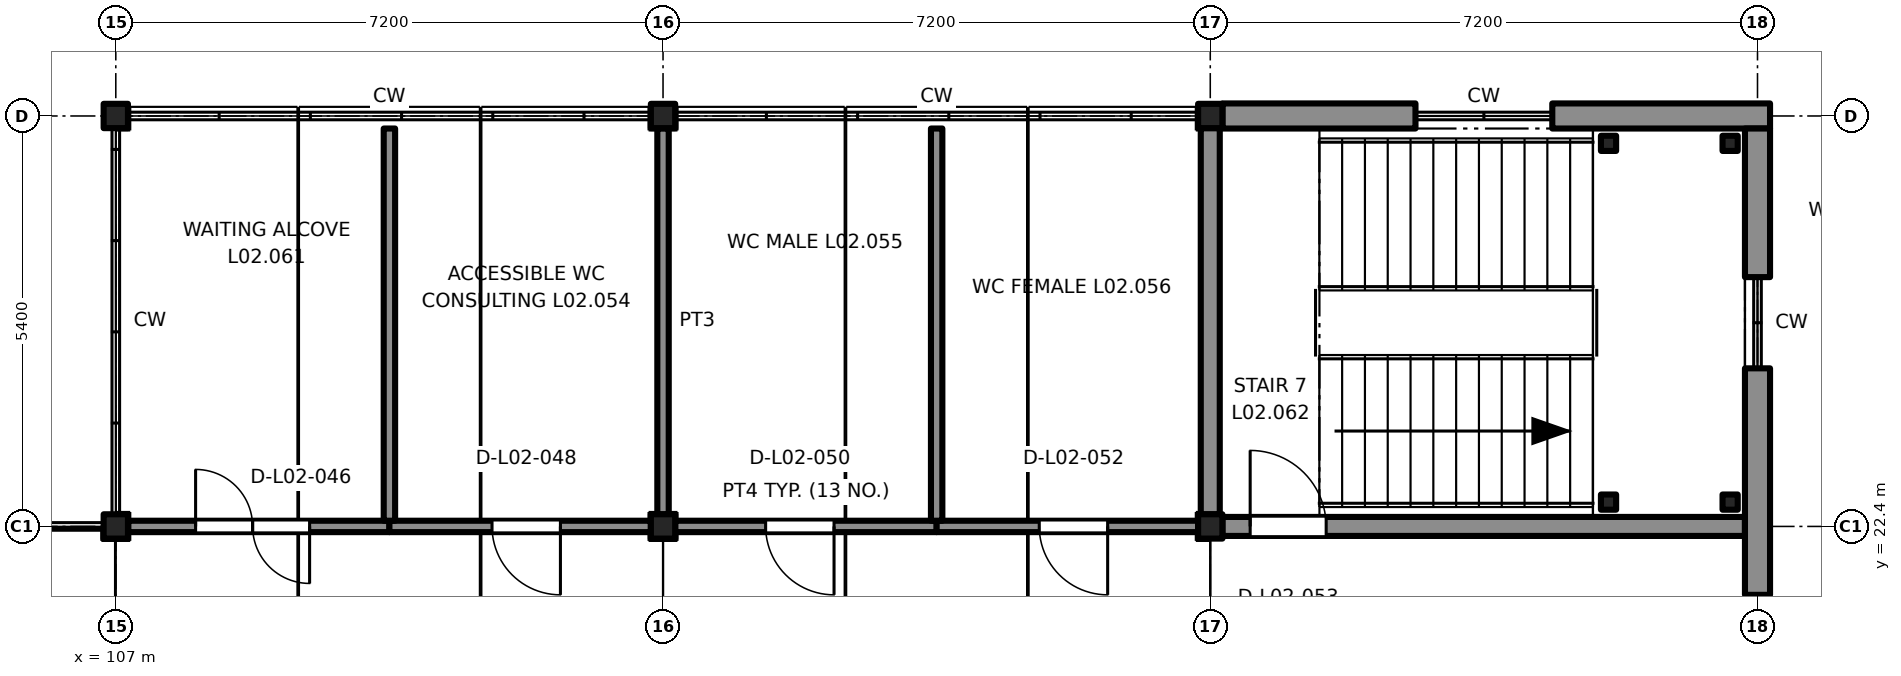
"""IFC4 building model, lengths in metres.
Left out: names, types, materials, properties, quantities, classifications, styles, units other than length and angle.
Written with IfcOpenShell. Run it as: python <this file> out.ifc"""

import sys

from ifc_helpers import new_model, si_unit, direction, frame, frame_2d, origin, origin_2d, place, context, subcontext, project, spatial, rectangle, extrude, element, fill, save


model = new_model("IFC4")
c1 = context("Model", 3, precision=1e-05, world=origin(), true_north=direction((0.0, 1.0)))
c2 = subcontext(c1, "Body", "Model", "MODEL_VIEW")
j1 = project(units=[si_unit("LENGTHUNIT", "METRE"), si_unit("PLANEANGLEUNIT", "RADIAN")], contexts=[c1])
p1 = place(None, origin())
s1 = spatial("IfcSite", under=j1, at=p1, CompositionType="ELEMENT")
p2 = place(p1, origin())
s2 = spatial("IfcBuilding", under=s1, at=p2, CompositionType="ELEMENT")
p3 = place(p2, frame((0.0, 0.0, 10.2)))
s3 = spatial("IfcBuildingStorey", under=s2, at=p3, CompositionType="ELEMENT", Elevation=10.2)
for number, where, z_axis, x_axis in (
    (1, (107.0, 22.4, 0.0), (0.0, 0.0, 1.0), (1.0, 0.0, 0.0)),
    (2, (107.0, 27.8, 0.0), (0.0, 0.0, 1.0), (1.0, 0.0, 0.0)),
    (3, (114.2, 22.4, 0.0), (0.0, 0.0, 1.0), (1.0, 0.0, 0.0)),
    (4, (114.2, 27.8, 0.0), (0.0, 0.0, 1.0), (1.0, 0.0, 0.0)),
    (5, (121.4, 22.4, 0.0), (0.0, 0.0, 1.0), (1.0, 0.0, 0.0)),
    (6, (121.4, 27.8, 0.0), (0.0, 0.0, 1.0), (1.0, 0.0, 0.0)),
):
    element("IfcColumn", number, at=place(p3, frame(where, z_axis=z_axis, x_axis=x_axis)), inside=s3, PredefinedType="COLUMN", context=c2, shape_type="SweptSolid", body=[
        extrude(rectangle(XDim=0.32, YDim=0.32, at=origin_2d()), origin(), (0.0, 0.0, 1.0), 3.9),
    ])
p4 = place(p3, frame((121.56, 22.4, 0.0), z_axis=(0.0, 0.0, 1.0), x_axis=(1.0, 0.0, 0.0)))
e7 = element("IfcWall", 7, at=p4, inside=s3, PredefinedType="SHEAR", context=c2, shape_type="SweptSolid", body=[
    extrude(rectangle(XDim=6.875, YDim=0.25, at=frame_2d((3.438, 0.0))), origin(), (0.0, 0.0, 1.0), 3.65),
])
p5 = place(p4, frame((0.365, 0.0, 0.0)))
e8 = element("IfcOpeningElement", 8, at=p5, cuts=e7, PredefinedType="OPENING", context=c2, shape_type="SweptSolid", body=[
    extrude(rectangle(XDim=1.0, YDim=2.1, at=frame_2d((0.5, 1.05))), frame((0.0, 0.135, 0.0), z_axis=(0.0, -1.0, 0.0), x_axis=(1.0, 0.0, 0.0)), (0.0, 0.0, 1.0), 0.27),
])
p6 = place(p3, frame((121.4, 22.56, 0.0), z_axis=(0.0, 0.0, 1.0), x_axis=(0.0, 1.0, 0.0)))
e9 = element("IfcWall", 9, at=p6, inside=s3, PredefinedType="SHEAR", context=c2, shape_type="SweptSolid", body=[
    extrude(rectangle(XDim=5.08, YDim=0.25, at=frame_2d((2.54, 0.0))), origin(), (0.0, 0.0, 1.0), 3.65),
])
for number, where, z_axis, x_axis in (
    (10, (128.24, 22.72, 0.0), (0.0, 0.0, 1.0), (1.0, 0.0, 0.0)),
    (11, (128.24, 27.44, 0.0), (0.0, 0.0, 1.0), (1.0, 0.0, 0.0)),
    (12, (126.64, 22.72, 0.0), (0.0, 0.0, 1.0), (1.0, 0.0, 0.0)),
    (13, (126.64, 27.44, 0.0), (0.0, 0.0, 1.0), (1.0, 0.0, 0.0)),
):
    element("IfcColumn", number, at=place(p3, frame(where, z_axis=z_axis, x_axis=x_axis)), inside=s3, PredefinedType="COLUMN", context=c2, shape_type="SweptSolid", body=[
        extrude(rectangle(XDim=0.2, YDim=0.2, at=origin_2d()), origin(), (0.0, 0.0, 1.0), 3.9),
    ])
p7 = place(p3, frame((121.56, 27.8, 0.0), z_axis=(0.0, 0.0, 1.0), x_axis=(1.0, 0.0, 0.0)))
e14 = element("IfcWall", 14, at=p7, inside=s3, PredefinedType="SOLIDWALL", context=c2, shape_type="SweptSolid", body=[
    extrude(rectangle(XDim=2.54, YDim=0.33, at=frame_2d((1.27, 0.0))), origin(), (0.0, 0.0, 1.0), 3.22),
])
p8 = place(p3, frame((125.9, 27.8, 0.0), z_axis=(0.0, 0.0, 1.0), x_axis=(1.0, 0.0, 0.0)))
e15 = element("IfcWall", 15, at=p8, inside=s3, PredefinedType="SOLIDWALL", context=c2, shape_type="SweptSolid", body=[
    extrude(rectangle(XDim=2.865, YDim=0.33, at=frame_2d((1.433, 0.0))), origin(), (0.0, 0.0, 1.0), 3.22),
])
p9 = place(p3, frame((128.6, 24.48, 0.0), z_axis=(0.0, 0.0, 1.0), x_axis=(0.0, -1.0, 0.0)))
e16 = element("IfcWall", 16, at=p9, inside=s3, PredefinedType="SOLIDWALL", context=c2, shape_type="SweptSolid", body=[
    extrude(rectangle(XDim=2.98, YDim=0.33, at=frame_2d((1.49, 0.0))), origin(), (0.0, 0.0, 1.0), 3.2),
])
p10 = place(p3, frame((128.6, 27.635, 0.0), z_axis=(0.0, 0.0, 1.0), x_axis=(0.0, -1.0, 0.0)))
e17 = element("IfcWall", 17, at=p10, inside=s3, PredefinedType="SOLIDWALL", context=c2, shape_type="SweptSolid", body=[
    extrude(rectangle(XDim=1.955, YDim=0.33, at=frame_2d((0.978, 0.0))), origin(), (0.0, 0.0, 1.0), 3.2),
])
p11 = place(p3, frame((107.165, 22.4, 0.0), z_axis=(0.0, 0.0, 1.0), x_axis=(1.0, 0.0, 0.0)))
e18 = element("IfcWall", 18, at=p11, inside=s3, PredefinedType="PARTITIONING", context=c2, shape_type="SweptSolid", body=[
    extrude(rectangle(XDim=3.435, YDim=0.15, at=frame_2d((1.718, 0.0))), origin(), (0.0, 0.0, 1.0), 3.22),
])
p12 = place(p11, frame((0.885, 0.0, 0.0)))
e19 = element("IfcOpeningElement", 19, at=p12, cuts=e18, PredefinedType="OPENING", context=c2, shape_type="SweptSolid", body=[
    extrude(rectangle(XDim=1.5, YDim=2.1, at=frame_2d((0.75, 1.05))), frame((0.0, 0.085, 0.0), z_axis=(0.0, -1.0, 0.0), x_axis=(1.0, 0.0, 0.0)), (0.0, 0.0, 1.0), 0.17),
])
p13 = place(p3, frame((114.04, 22.4, 0.0), z_axis=(0.0, 0.0, 1.0), x_axis=(-1.0, 0.0, 0.0)))
e20 = element("IfcWall", 20, at=p13, inside=s3, PredefinedType="PARTITIONING", context=c2, shape_type="SweptSolid", body=[
    extrude(rectangle(XDim=3.44, YDim=0.15, at=frame_2d((1.72, 0.0))), origin(), (0.0, 0.0, 1.0), 3.22),
])
p14 = place(p13, frame((1.19, 0.0, 0.0)))
e21 = element("IfcOpeningElement", 21, at=p14, cuts=e20, PredefinedType="OPENING", context=c2, shape_type="SweptSolid", body=[
    extrude(rectangle(XDim=0.9, YDim=2.1, at=frame_2d((0.45, 1.05))), frame((0.0, 0.085, 0.0), z_axis=(0.0, -1.0, 0.0), x_axis=(1.0, 0.0, 0.0)), (0.0, 0.0, 1.0), 0.17),
])
p15 = place(p3, frame((110.6, 27.635, 0.0), z_axis=(0.0, 0.0, 1.0), x_axis=(0.0, -1.0, 0.0)))
e22 = element("IfcWall", 22, at=p15, inside=s3, PredefinedType="PARTITIONING", context=c2, shape_type="SweptSolid", body=[
    extrude(rectangle(XDim=5.16, YDim=0.15, at=frame_2d((2.58, 0.0))), origin(), (0.0, 0.0, 1.0), 3.38),
])
p16 = place(p3, frame((117.8, 22.4, 0.0), z_axis=(0.0, 0.0, 1.0), x_axis=(-1.0, 0.0, 0.0)))
e23 = element("IfcWall", 23, at=p16, inside=s3, PredefinedType="PARTITIONING", context=c2, shape_type="SweptSolid", body=[
    extrude(rectangle(XDim=3.44, YDim=0.15, at=frame_2d((1.72, 0.0))), origin(), (0.0, 0.0, 1.0), 3.22),
])
p17 = place(p16, frame((1.35, 0.0, 0.0)))
e24 = element("IfcOpeningElement", 24, at=p17, cuts=e23, PredefinedType="OPENING", context=c2, shape_type="SweptSolid", body=[
    extrude(rectangle(XDim=0.9, YDim=2.1, at=frame_2d((0.45, 1.05))), frame((0.0, 0.085, 0.0), z_axis=(0.0, -1.0, 0.0), x_axis=(1.0, 0.0, 0.0)), (0.0, 0.0, 1.0), 0.17),
])
p18 = place(p3, frame((114.2, 27.635, 0.0), z_axis=(0.0, 0.0, 1.0), x_axis=(0.0, -1.0, 0.0)))
e25 = element("IfcWall", 25, at=p18, inside=s3, PredefinedType="PARTITIONING", context=c2, shape_type="SweptSolid", body=[
    extrude(rectangle(XDim=5.075, YDim=0.15, at=frame_2d((2.538, 0.0))), origin(), (0.0, 0.0, 1.0), 3.38),
])
p19 = place(p3, frame((121.24, 22.4, 0.0), z_axis=(0.0, 0.0, 1.0), x_axis=(-1.0, 0.0, 0.0)))
e26 = element("IfcWall", 26, at=p19, inside=s3, PredefinedType="PARTITIONING", context=c2, shape_type="SweptSolid", body=[
    extrude(rectangle(XDim=3.44, YDim=0.15, at=frame_2d((1.72, 0.0))), origin(), (0.0, 0.0, 1.0), 3.22),
])
p20 = place(p19, frame((1.19, 0.0, 0.0)))
e27 = element("IfcOpeningElement", 27, at=p20, cuts=e26, PredefinedType="OPENING", context=c2, shape_type="SweptSolid", body=[
    extrude(rectangle(XDim=0.9, YDim=2.1, at=frame_2d((0.45, 1.05))), frame((0.0, 0.085, 0.0), z_axis=(0.0, -1.0, 0.0), x_axis=(1.0, 0.0, 0.0)), (0.0, 0.0, 1.0), 0.17),
])
p21 = place(p3, frame((117.8, 27.635, 0.0), z_axis=(0.0, 0.0, 1.0), x_axis=(0.0, -1.0, 0.0)))
e28 = element("IfcWall", 28, at=p21, inside=s3, PredefinedType="PARTITIONING", context=c2, shape_type="SweptSolid", body=[
    extrude(rectangle(XDim=5.16, YDim=0.15, at=frame_2d((2.58, 0.0))), origin(), (0.0, 0.0, 1.0), 3.38),
])
p22 = place(p5, origin())
e29 = element("IfcDoor", 29, at=p22, inside=s3, OperationType="SINGLE_SWING_RIGHT", PredefinedType="DOOR", context=c2, shape_type="SweptSolid", body=[
    extrude(rectangle(XDim=1.0, YDim=2.1, at=frame_2d((0.5, 1.05))), frame((0.0, 0.025, 0.0), z_axis=(0.0, -1.0, 0.0), x_axis=(1.0, 0.0, 0.0)), (0.0, 0.0, 1.0), 0.05),
])
fill(e8, e29)
p23 = place(p12, origin())
e30 = element("IfcDoor", 30, at=p23, inside=s3, OperationType="DOUBLE_DOOR_SINGLE_SWING", PredefinedType="DOOR", context=c2, shape_type="SweptSolid", body=[
    extrude(rectangle(XDim=1.5, YDim=2.1, at=frame_2d((0.75, 1.05))), frame((0.0, 0.025, 0.0), z_axis=(0.0, -1.0, 0.0), x_axis=(1.0, 0.0, 0.0)), (0.0, 0.0, 1.0), 0.05),
])
fill(e19, e30)
p24 = place(p14, origin())
e31 = element("IfcDoor", 31, at=p24, inside=s3, OperationType="SINGLE_SWING_LEFT", PredefinedType="DOOR", context=c2, shape_type="SweptSolid", body=[
    extrude(rectangle(XDim=0.9, YDim=2.1, at=frame_2d((0.45, 1.05))), frame((0.0, 0.025, 0.0), z_axis=(0.0, -1.0, 0.0), x_axis=(1.0, 0.0, 0.0)), (0.0, 0.0, 1.0), 0.05),
])
fill(e21, e31)
p25 = place(p17, origin())
e32 = element("IfcDoor", 32, at=p25, inside=s3, OperationType="SINGLE_SWING_RIGHT", PredefinedType="DOOR", context=c2, shape_type="SweptSolid", body=[
    extrude(rectangle(XDim=0.9, YDim=2.1, at=frame_2d((0.45, 1.05))), frame((0.0, 0.025, 0.0), z_axis=(0.0, -1.0, 0.0), x_axis=(1.0, 0.0, 0.0)), (0.0, 0.0, 1.0), 0.05),
])
fill(e24, e32)
p26 = place(p20, origin())
e33 = element("IfcDoor", 33, at=p26, inside=s3, OperationType="SINGLE_SWING_LEFT", PredefinedType="DOOR", context=c2, shape_type="SweptSolid", body=[
    extrude(rectangle(XDim=0.9, YDim=2.1, at=frame_2d((0.45, 1.05))), frame((0.0, 0.025, 0.0), z_axis=(0.0, -1.0, 0.0), x_axis=(1.0, 0.0, 0.0)), (0.0, 0.0, 1.0), 0.05),
])
fill(e27, e33)
save(model, sys.argv[1])
